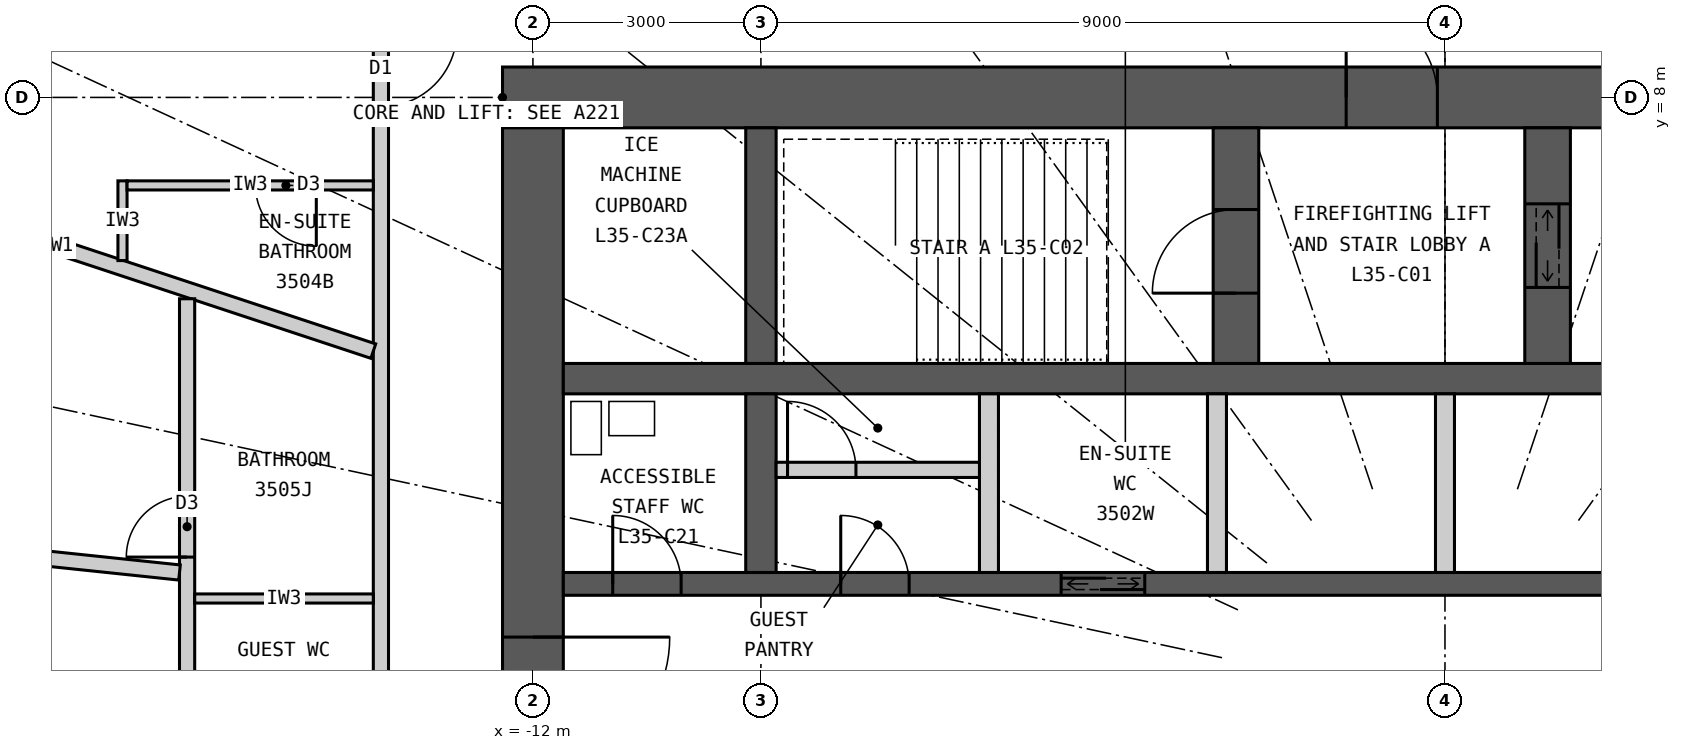
"""IFC4 building model, lengths in metres.
Left out: names, types, materials, properties, quantities, classifications, styles, units other than length and angle.
Written with IfcOpenShell. Run it as: python <this file> out.ifc"""

import sys

from ifc_helpers import new_model, si_unit, direction, frame, frame_2d, origin, place, context, subcontext, project, spatial, rectangle, extrude, element, fill, save


model = new_model("IFC4")
c1 = context("Model", 3, precision=1e-05, world=origin(), true_north=direction((0.0, 1.0)))
c2 = subcontext(c1, "Body", "Model", "MODEL_VIEW")
j1 = project(units=[si_unit("LENGTHUNIT", "METRE"), si_unit("PLANEANGLEUNIT", "RADIAN")], contexts=[c1])
p1 = place(None, origin())
s1 = spatial("IfcSite", under=j1, at=p1, CompositionType="ELEMENT")
p2 = place(p1, origin())
s2 = spatial("IfcBuilding", under=s1, at=p2, CompositionType="ELEMENT")
p3 = place(p2, frame((0.0, 0.0, 135.3)))
s3 = spatial("IfcBuildingStorey", under=s2, at=p3, CompositionType="ELEMENT", Elevation=135.3)
p4 = place(p3, frame((-12.4, 8.0, 0.0), z_axis=(0.0, 0.0, 1.0), x_axis=(1.0, 0.0, 0.0)))
e1 = element("IfcWall", 1, at=p4, inside=s3, PredefinedType="SHEAR", context=c2, shape_type="SweptSolid", body=[
    extrude(rectangle(XDim=24.8, YDim=0.8, at=frame_2d((12.4, 0.0))), origin(), (0.0, 0.0, 1.0), 3.3),
])
p5 = place(p4, frame((11.1, 0.0, 0.0)))
e2 = element("IfcOpeningElement", 2, at=p5, cuts=e1, PredefinedType="OPENING", context=c2, shape_type="SweptSolid", body=[
    extrude(rectangle(XDim=1.2, YDim=2.2, at=frame_2d((0.6, 1.1))), frame((0.0, 0.41, 0.0), z_axis=(0.0, -1.0, 0.0), x_axis=(1.0, 0.0, 0.0)), (0.0, 0.0, 1.0), 0.82),
])
p6 = place(p4, frame((18.7, 0.0, 0.0)))
e3 = element("IfcOpeningElement", 3, at=p6, cuts=e1, PredefinedType="OPENING", context=c2, shape_type="SweptSolid", body=[
    extrude(rectangle(XDim=0.9, YDim=2.2, at=frame_2d((0.45, 1.1))), frame((0.0, 0.41, 0.0), z_axis=(0.0, -1.0, 0.0), x_axis=(1.0, 0.0, 0.0)), (0.0, 0.0, 1.0), 0.82),
])
p7 = place(p3, frame((-12.0, 7.6, 0.0), z_axis=(0.0, 0.0, 1.0), x_axis=(0.0, -1.0, 0.0)))
e4 = element("IfcWall", 4, at=p7, inside=s3, PredefinedType="SHEAR", context=c2, shape_type="SweptSolid", body=[
    extrude(rectangle(XDim=15.2, YDim=0.8, at=frame_2d((7.6, 0.0))), origin(), (0.0, 0.0, 1.0), 3.3),
])
p8 = place(p7, frame((6.7, 0.0, 0.0)))
e5 = element("IfcOpeningElement", 5, at=p8, cuts=e4, PredefinedType="OPENING", context=c2, shape_type="SweptSolid", body=[
    extrude(rectangle(XDim=1.8, YDim=2.2, at=frame_2d((0.9, 1.1))), frame((0.0, 0.41, 0.0), z_axis=(0.0, -1.0, 0.0), x_axis=(1.0, 0.0, 0.0)), (0.0, 0.0, 1.0), 0.82),
])
p9 = place(p3, frame((-11.6, 4.3, 0.0), z_axis=(0.0, 0.0, 1.0), x_axis=(1.0, 0.0, 0.0)))
e6 = element("IfcWall", 6, at=p9, inside=s3, PredefinedType="SHEAR", context=c2, shape_type="SweptSolid", body=[
    extrude(rectangle(XDim=23.2, YDim=0.4, at=frame_2d((11.6, 0.0))), origin(), (0.0, 0.0, 1.0), 3.3),
])
p10 = place(p3, frame((-11.6, 1.6, 0.0), z_axis=(0.0, 0.0, 1.0), x_axis=(1.0, 0.0, 0.0)))
e7 = element("IfcWall", 7, at=p10, inside=s3, PredefinedType="SHEAR", context=c2, shape_type="SweptSolid", body=[
    extrude(rectangle(XDim=23.2, YDim=0.3, at=frame_2d((11.6, 0.0))), origin(), (0.0, 0.0, 1.0), 3.3),
])
p11 = place(p10, frame((6.55, 0.0, 0.0)))
e8 = element("IfcOpeningElement", 8, at=p11, cuts=e7, PredefinedType="OPENING", context=c2, shape_type="SweptSolid", body=[
    extrude(rectangle(XDim=1.1, YDim=2.2, at=frame_2d((0.55, 1.1))), frame((0.0, 0.16, 0.0), z_axis=(0.0, -1.0, 0.0), x_axis=(1.0, 0.0, 0.0)), (0.0, 0.0, 1.0), 0.32),
])
p12 = place(p10, frame((0.65, 0.0, 0.0)))
e9 = element("IfcOpeningElement", 9, at=p12, cuts=e7, PredefinedType="OPENING", context=c2, shape_type="SweptSolid", body=[
    extrude(rectangle(XDim=0.9, YDim=2.2, at=frame_2d((0.45, 1.1))), frame((0.0, 0.16, 0.0), z_axis=(0.0, -1.0, 0.0), x_axis=(1.0, 0.0, 0.0)), (0.0, 0.0, 1.0), 0.32),
])
p13 = place(p10, frame((21.65, 0.0, 0.0)))
e10 = element("IfcOpeningElement", 10, at=p13, cuts=e7, PredefinedType="OPENING", context=c2, shape_type="SweptSolid", body=[
    extrude(rectangle(XDim=0.9, YDim=2.2, at=frame_2d((0.45, 1.1))), frame((0.0, 0.16, 0.0), z_axis=(0.0, -1.0, 0.0), x_axis=(1.0, 0.0, 0.0)), (0.0, 0.0, 1.0), 0.32),
])
p14 = place(p10, frame((3.65, 0.0, 0.0)))
e11 = element("IfcOpeningElement", 11, at=p14, cuts=e7, PredefinedType="OPENING", context=c2, shape_type="SweptSolid", body=[
    extrude(rectangle(XDim=0.9, YDim=2.2, at=frame_2d((0.45, 1.1))), frame((0.0, 0.16, 0.0), z_axis=(0.0, -1.0, 0.0), x_axis=(1.0, 0.0, 0.0)), (0.0, 0.0, 1.0), 0.32),
])
p15 = place(p3, frame((-9.0, 4.5, 0.0), z_axis=(0.0, 0.0, 1.0), x_axis=(0.0, 1.0, 0.0)))
e12 = element("IfcWall", 12, at=p15, inside=s3, PredefinedType="SHEAR", context=c2, shape_type="SweptSolid", body=[
    extrude(rectangle(XDim=3.1, YDim=0.4, at=frame_2d((1.55, 0.0))), origin(), (0.0, 0.0, 1.0), 3.3),
])
p16 = place(p3, frame((-9.0, 1.75, 0.0), z_axis=(0.0, 0.0, 1.0), x_axis=(0.0, 1.0, 0.0)))
e13 = element("IfcWall", 13, at=p16, inside=s3, PredefinedType="SHEAR", context=c2, shape_type="SweptSolid", body=[
    extrude(rectangle(XDim=2.35, YDim=0.4, at=frame_2d((1.175, 0.0))), origin(), (0.0, 0.0, 1.0), 3.3),
])
p17 = place(p3, frame((-2.75, 4.5, 0.0), z_axis=(0.0, 0.0, 1.0), x_axis=(0.0, 1.0, 0.0)))
e14 = element("IfcWall", 14, at=p17, inside=s3, PredefinedType="SHEAR", context=c2, shape_type="SweptSolid", body=[
    extrude(rectangle(XDim=3.1, YDim=0.6, at=frame_2d((1.55, 0.0))), origin(), (0.0, 0.0, 1.0), 3.3),
])
p18 = place(p17, frame((0.925, 0.0, 0.0)))
e15 = element("IfcOpeningElement", 15, at=p18, cuts=e14, PredefinedType="OPENING", context=c2, shape_type="SweptSolid", body=[
    extrude(rectangle(XDim=1.1, YDim=2.2, at=frame_2d((0.55, 1.1))), frame((0.0, 0.31, 0.0), z_axis=(0.0, -1.0, 0.0), x_axis=(1.0, 0.0, 0.0)), (0.0, 0.0, 1.0), 0.62),
])
p19 = place(p3, frame((1.35, 4.5, 0.0), z_axis=(0.0, 0.0, 1.0), x_axis=(0.0, 1.0, 0.0)))
e16 = element("IfcWall", 16, at=p19, inside=s3, PredefinedType="SHEAR", context=c2, shape_type="SweptSolid", body=[
    extrude(rectangle(XDim=3.1, YDim=0.6, at=frame_2d((1.55, 0.0))), origin(), (0.0, 0.0, 1.0), 3.3),
])
p20 = place(p19, frame((1.0, 0.0, 0.0)))
e17 = element("IfcOpeningElement", 17, at=p20, cuts=e16, PredefinedType="OPENING", context=c2, shape_type="SweptSolid", body=[
    extrude(rectangle(XDim=1.1, YDim=2.2, at=frame_2d((0.55, 1.1))), frame((0.0, 0.31, 0.0), z_axis=(0.0, -1.0, 0.0), x_axis=(1.0, 0.0, 0.0)), (0.0, 0.0, 1.0), 0.62),
])
for number, where, z_axis, x_axis in (
    (18, (-6.0, 1.75, 0.0), (0.0, 0.0, 1.0), (0.0, 1.0, 0.0)),
    (19, (-3.0, 1.75, 0.0), (0.0, 0.0, 1.0), (0.0, 1.0, 0.0)),
    (20, (0.0, 1.75, 0.0), (0.0, 0.0, 1.0), (0.0, 1.0, 0.0)),
):
    element("IfcWall", number, at=place(p3, frame(where, z_axis=z_axis, x_axis=x_axis)), inside=s3, PredefinedType="PARTITIONING", context=c2, shape_type="SweptSolid", body=[
        extrude(rectangle(XDim=2.35, YDim=0.25, at=frame_2d((1.175, 0.0))), origin(), (0.0, 0.0, 1.0), 3.3),
    ])
p21 = place(p3, frame((-14.0, 9.9, 0.0), z_axis=(0.0, 0.0, 1.0), x_axis=(0.0, -1.0, 0.0)))
e21 = element("IfcWall", 21, at=p21, inside=s3, PredefinedType="PARTITIONING", context=c2, shape_type="SweptSolid", body=[
    extrude(rectangle(XDim=19.8, YDim=0.2, at=frame_2d((9.9, 0.0))), origin(), (0.0, 0.0, 1.0), 3.05),
])
p22 = place(p21, frame((1.025, 0.0, 0.0)))
e22 = element("IfcOpeningElement", 22, at=p22, cuts=e21, PredefinedType="OPENING", context=c2, shape_type="SweptSolid", body=[
    extrude(rectangle(XDim=1.0, YDim=2.2, at=frame_2d((0.5, 1.1))), frame((0.0, 0.11, 0.0), z_axis=(0.0, -1.0, 0.0), x_axis=(1.0, 0.0, 0.0)), (0.0, 0.0, 1.0), 0.22),
])
p23 = place(p21, frame((10.831, 0.0, 0.0)))
e23 = element("IfcOpeningElement", 23, at=p23, cuts=e21, PredefinedType="OPENING", context=c2, shape_type="SweptSolid", body=[
    extrude(rectangle(XDim=1.0, YDim=2.2, at=frame_2d((0.5, 1.1))), frame((0.0, 0.11, 0.0), z_axis=(0.0, -1.0, 0.0), x_axis=(1.0, 0.0, 0.0)), (0.0, 0.0, 1.0), 0.22),
])
p24 = place(p3, frame((-14.1, 4.662, 0.0), z_axis=(0.0, 0.0, 1.0), x_axis=(-0.949446466373, 0.313928984789, 0.0)))
e24 = element("IfcWall", 24, at=p24, inside=s3, PredefinedType="PARTITIONING", context=c2, shape_type="SweptSolid", body=[
    extrude(rectangle(XDim=8.797, YDim=0.2, at=frame_2d((4.399, 0.0))), origin(), (0.0, 0.0, 1.0), 3.05),
])
p25 = place(p3, frame((-17.4, 5.854, 0.0), z_axis=(0.0, 0.0, 1.0), x_axis=(0.0, 1.0, 0.0)))
e25 = element("IfcWall", 25, at=p25, inside=s3, PredefinedType="PARTITIONING", context=c2, shape_type="SweptSolid", body=[
    extrude(rectangle(XDim=1.049, YDim=0.12, at=frame_2d((0.524, 0.0))), origin(), (0.0, 0.0, 1.0), 3.05),
])
p26 = place(p3, frame((-14.1, 6.842, 0.0), z_axis=(0.0, 0.0, 1.0), x_axis=(-1.0, 0.0, 0.0)))
e26 = element("IfcWall", 26, at=p26, inside=s3, PredefinedType="PARTITIONING", context=c2, shape_type="SweptSolid", body=[
    extrude(rectangle(XDim=3.24, YDim=0.12, at=frame_2d((1.62, 0.0))), origin(), (0.0, 0.0, 1.0), 3.05),
])
p27 = place(p26, frame((0.75, 0.0, 0.0)))
e27 = element("IfcOpeningElement", 27, at=p27, cuts=e26, PredefinedType="OPENING", context=c2, shape_type="SweptSolid", body=[
    extrude(rectangle(XDim=0.8, YDim=2.1, at=frame_2d((0.4, 1.05))), frame((0.0, 0.07, 0.0), z_axis=(0.0, -1.0, 0.0), x_axis=(1.0, 0.0, 0.0)), (0.0, 0.0, 1.0), 0.14),
])
p28 = place(p3, frame((-16.55, 5.351, 0.0), z_axis=(0.0, 0.0, 1.0), x_axis=(0.0, -1.0, 0.0)))
e28 = element("IfcWall", 28, at=p28, inside=s3, PredefinedType="PARTITIONING", context=c2, shape_type="SweptSolid", body=[
    extrude(rectangle(XDim=14.96, YDim=0.2, at=frame_2d((7.48, 0.0))), origin(), (0.0, 0.0, 1.0), 3.05),
])
p29 = place(p28, frame((2.599, 0.0, 0.0)))
e29 = element("IfcOpeningElement", 29, at=p29, cuts=e28, PredefinedType="OPENING", context=c2, shape_type="SweptSolid", body=[
    extrude(rectangle(XDim=0.8, YDim=2.1, at=frame_2d((0.4, 1.05))), frame((0.0, 0.11, 0.0), z_axis=(0.0, -1.0, 0.0), x_axis=(1.0, 0.0, 0.0)), (0.0, 0.0, 1.0), 0.22),
])
p30 = place(p28, frame((11.27, 0.0, 0.0)))
e30 = element("IfcOpeningElement", 30, at=p30, cuts=e28, PredefinedType="OPENING", context=c2, shape_type="SweptSolid", body=[
    extrude(rectangle(XDim=0.8, YDim=2.1, at=frame_2d((0.4, 1.05))), frame((0.0, 0.11, 0.0), z_axis=(0.0, -1.0, 0.0), x_axis=(1.0, 0.0, 0.0)), (0.0, 0.0, 1.0), 0.22),
])
p31 = place(p28, frame((6.782, 0.0, 0.0)))
e31 = element("IfcOpeningElement", 31, at=p31, cuts=e28, PredefinedType="OPENING", context=c2, shape_type="SweptSolid", body=[
    extrude(rectangle(XDim=0.9, YDim=2.1, at=frame_2d((0.45, 1.05))), frame((0.0, 0.11, 0.0), z_axis=(0.0, -1.0, 0.0), x_axis=(1.0, 0.0, 0.0)), (0.0, 0.0, 1.0), 0.22),
])
p32 = place(p3, frame((-16.65, 1.75, 0.0), z_axis=(0.0, 0.0, 1.0), x_axis=(-0.994524630042, 0.104502441313, 0.0)))
e32 = element("IfcWall", 32, at=p32, inside=s3, PredefinedType="PARTITIONING", context=c2, shape_type="SweptSolid", body=[
    extrude(rectangle(XDim=7.527, YDim=0.2, at=frame_2d((3.764, 0.0))), origin(), (0.0, 0.0, 1.0), 3.05),
])
p33 = place(p32, frame((2.57, 0.0, 0.0)))
e33 = element("IfcOpeningElement", 33, at=p33, cuts=e32, PredefinedType="OPENING", context=c2, shape_type="SweptSolid", body=[
    extrude(rectangle(XDim=0.9, YDim=2.1, at=frame_2d((0.45, 1.05))), frame((0.0, 0.11, 0.0), z_axis=(0.0, -1.0, 0.0), x_axis=(1.0, 0.0, 0.0)), (0.0, 0.0, 1.0), 0.22),
])
p34 = place(p3, frame((-14.1, 1.408, 0.0), z_axis=(0.0, 0.0, 1.0), x_axis=(-1.0, 0.0, 0.0)))
e34 = element("IfcWall", 34, at=p34, inside=s3, PredefinedType="PARTITIONING", context=c2, shape_type="SweptSolid", body=[
    extrude(rectangle(XDim=2.35, YDim=0.12, at=frame_2d((1.175, 0.0))), origin(), (0.0, 0.0, 1.0), 2.3),
])
p35 = place(p3, frame((-8.8, 3.1, 0.0), z_axis=(0.0, 0.0, 1.0), x_axis=(1.0, 0.0, 0.0)))
e35 = element("IfcWall", 35, at=p35, inside=s3, PredefinedType="PARTITIONING", context=c2, shape_type="SweptSolid", body=[
    extrude(rectangle(XDim=2.675, YDim=0.2, at=frame_2d((1.337, 0.0))), origin(), (0.0, 0.0, 1.0), 3.05),
])
p36 = place(p35, frame((0.15, 0.0, 0.0)))
e36 = element("IfcOpeningElement", 36, at=p36, cuts=e35, PredefinedType="OPENING", context=c2, shape_type="SweptSolid", body=[
    extrude(rectangle(XDim=0.9, YDim=2.2, at=frame_2d((0.45, 1.1))), frame((0.0, 0.11, 0.0), z_axis=(0.0, -1.0, 0.0), x_axis=(1.0, 0.0, 0.0)), (0.0, 0.0, 1.0), 0.22),
])
p37 = place(p27, origin())
e37 = element("IfcDoor", 37, at=p37, inside=s3, OperationType="SINGLE_SWING_LEFT", PredefinedType="DOOR", context=c2, shape_type="SweptSolid", body=[
    extrude(rectangle(XDim=0.8, YDim=2.1, at=frame_2d((0.4, 1.05))), frame((0.0, 0.025, 0.0), z_axis=(0.0, -1.0, 0.0), x_axis=(1.0, 0.0, 0.0)), (0.0, 0.0, 1.0), 0.05),
])
fill(e27, e37)
p38 = place(p22, origin())
e38 = element("IfcDoor", 38, at=p38, inside=s3, OperationType="SINGLE_SWING_LEFT", PredefinedType="DOOR", context=c2, shape_type="SweptSolid", body=[
    extrude(rectangle(XDim=1.0, YDim=2.2, at=frame_2d((0.5, 1.1))), frame((0.0, 0.025, 0.0), z_axis=(0.0, -1.0, 0.0), x_axis=(1.0, 0.0, 0.0)), (0.0, 0.0, 1.0), 0.05),
])
fill(e22, e38)
p39 = place(p29, origin())
e39 = element("IfcDoor", 39, at=p39, inside=s3, OperationType="SINGLE_SWING_RIGHT", PredefinedType="DOOR", context=c2, shape_type="SweptSolid", body=[
    extrude(rectangle(XDim=0.8, YDim=2.1, at=frame_2d((0.4, 1.05))), frame((0.0, 0.025, 0.0), z_axis=(0.0, -1.0, 0.0), x_axis=(1.0, 0.0, 0.0)), (0.0, 0.0, 1.0), 0.05),
])
fill(e29, e39)
p40 = place(p5, origin())
e40 = element("IfcDoor", 40, at=p40, inside=s3, OperationType="SINGLE_SWING_LEFT", PredefinedType="DOOR", context=c2, shape_type="SweptSolid", body=[
    extrude(rectangle(XDim=1.2, YDim=2.2, at=frame_2d((0.6, 1.1))), frame((0.0, 0.025, 0.0), z_axis=(0.0, -1.0, 0.0), x_axis=(1.0, 0.0, 0.0)), (0.0, 0.0, 1.0), 0.05),
])
fill(e2, e40)
p41 = place(p18, origin())
e41 = element("IfcDoor", 41, at=p41, inside=s3, OperationType="SINGLE_SWING_LEFT", PredefinedType="DOOR", context=c2, shape_type="SweptSolid", body=[
    extrude(rectangle(XDim=1.1, YDim=2.2, at=frame_2d((0.55, 1.1))), frame((0.0, 0.025, 0.0), z_axis=(0.0, -1.0, 0.0), x_axis=(1.0, 0.0, 0.0)), (0.0, 0.0, 1.0), 0.05),
])
fill(e15, e41)
p42 = place(p20, origin())
e42 = element("IfcDoor", 42, at=p42, inside=s3, OperationType="DOUBLE_DOOR_SLIDING", PredefinedType="DOOR", context=c2, shape_type="SweptSolid", body=[
    extrude(rectangle(XDim=1.1, YDim=2.2, at=frame_2d((0.55, 1.1))), frame((0.0, 0.025, 0.0), z_axis=(0.0, -1.0, 0.0), x_axis=(1.0, 0.0, 0.0)), (0.0, 0.0, 1.0), 0.05),
])
fill(e17, e42)
p43 = place(p11, origin())
e43 = element("IfcDoor", 43, at=p43, inside=s3, OperationType="DOUBLE_DOOR_SLIDING", PredefinedType="DOOR", context=c2, shape_type="SweptSolid", body=[
    extrude(rectangle(XDim=1.1, YDim=2.2, at=frame_2d((0.55, 1.1))), frame((0.0, 0.025, 0.0), z_axis=(0.0, -1.0, 0.0), x_axis=(1.0, 0.0, 0.0)), (0.0, 0.0, 1.0), 0.05),
])
fill(e8, e43)
p44 = place(p12, origin())
e44 = element("IfcDoor", 44, at=p44, inside=s3, OperationType="SINGLE_SWING_LEFT", PredefinedType="DOOR", context=c2, shape_type="SweptSolid", body=[
    extrude(rectangle(XDim=0.9, YDim=2.2, at=frame_2d((0.45, 1.1))), frame((0.0, 0.025, 0.0), z_axis=(0.0, -1.0, 0.0), x_axis=(1.0, 0.0, 0.0)), (0.0, 0.0, 1.0), 0.05),
])
fill(e9, e44)
p45 = place(p14, origin())
e45 = element("IfcDoor", 45, at=p45, inside=s3, OperationType="SINGLE_SWING_LEFT", PredefinedType="DOOR", context=c2, shape_type="SweptSolid", body=[
    extrude(rectangle(XDim=0.9, YDim=2.2, at=frame_2d((0.45, 1.1))), frame((0.0, 0.025, 0.0), z_axis=(0.0, -1.0, 0.0), x_axis=(1.0, 0.0, 0.0)), (0.0, 0.0, 1.0), 0.05),
])
fill(e11, e45)
p46 = place(p36, origin())
e46 = element("IfcDoor", 46, at=p46, inside=s3, OperationType="SINGLE_SWING_LEFT", PredefinedType="DOOR", context=c2, shape_type="SweptSolid", body=[
    extrude(rectangle(XDim=0.9, YDim=2.2, at=frame_2d((0.45, 1.1))), frame((0.0, 0.025, 0.0), z_axis=(0.0, -1.0, 0.0), x_axis=(1.0, 0.0, 0.0)), (0.0, 0.0, 1.0), 0.05),
])
fill(e36, e46)
p47 = place(p8, origin())
e47 = element("IfcDoor", 47, at=p47, inside=s3, OperationType="DOUBLE_DOOR_DOUBLE_SWING", PredefinedType="DOOR", context=c2, shape_type="SweptSolid", body=[
    extrude(rectangle(XDim=1.8, YDim=2.2, at=frame_2d((0.9, 1.1))), frame((0.0, 0.025, 0.0), z_axis=(0.0, -1.0, 0.0), x_axis=(1.0, 0.0, 0.0)), (0.0, 0.0, 1.0), 0.05),
])
fill(e5, e47)
save(model, sys.argv[1])
